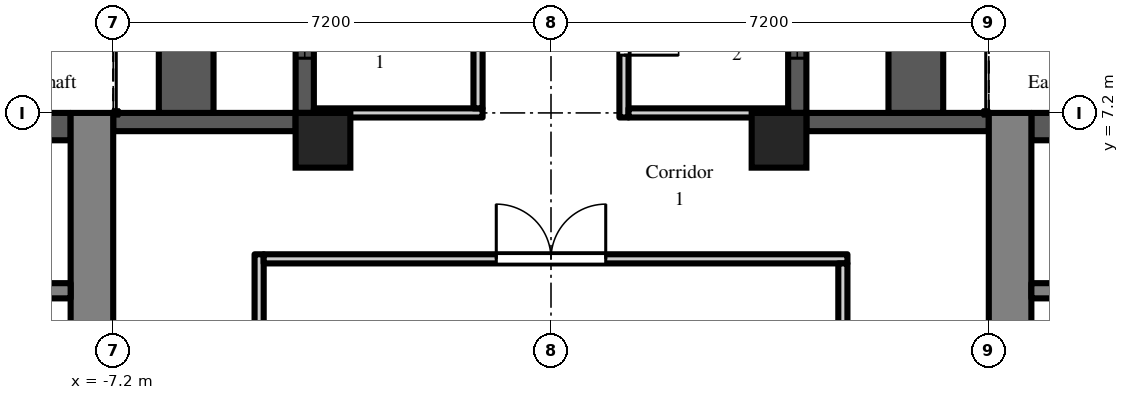
"""IFC4 building model, lengths in metres.
Left out: names, types, materials, properties, quantities, classifications, styles, units other than length and angle.
Written with IfcOpenShell. Run it as: python <this file> out.ifc"""

import sys

from ifc_helpers import new_model, si_unit, direction, frame, frame_2d, origin, origin_2d, place, context, subcontext, project, spatial, rectangle, extrude, element, fill, save


model = new_model("IFC4")
c1 = context("Model", 3, precision=1e-05, world=origin(), true_north=direction((0.0, 1.0)))
c2 = subcontext(c1, "Body", "Model", "MODEL_VIEW")
j1 = project(units=[si_unit("LENGTHUNIT", "METRE"), si_unit("PLANEANGLEUNIT", "RADIAN")], contexts=[c1])
p1 = place(None, origin())
s1 = spatial("IfcSite", under=j1, at=p1, CompositionType="ELEMENT")
p2 = place(p1, origin())
s2 = spatial("IfcBuilding", under=s1, at=p2, CompositionType="ELEMENT")
p3 = place(p2, frame((0.0, 0.0, 123.3)))
s3 = spatial("IfcBuildingStorey", under=s2, at=p3, CompositionType="ELEMENT", Elevation=123.3)
for number, where, z_axis, x_axis in (
    (1, (-3.75, 6.75, 0.0), (0.0, 0.0, 1.0), (1.0, 0.0, 0.0)),
    (2, (3.75, 6.75, 0.0), (0.0, 0.0, 1.0), (1.0, 0.0, 0.0)),
):
    element("IfcColumn", number, at=place(p3, frame(where, z_axis=z_axis, x_axis=x_axis)), inside=s3, PredefinedType="COLUMN", context=c2, shape_type="SweptSolid", body=[
        extrude(rectangle(XDim=0.9, YDim=0.9, at=origin_2d()), origin(), (0.0, 0.0, 1.0), 3.0),
    ])
p4 = place(p3, frame((7.2, 7.05, 0.0), z_axis=(0.0, 0.0, 1.0), x_axis=(-1.0, 0.0, 0.0)))
e3 = element("IfcWall", 3, at=p4, inside=s3, PredefinedType="SOLIDWALL", context=c2, shape_type="SweptSolid", body=[
    extrude(rectangle(XDim=3.0, YDim=0.3, at=frame_2d((1.5, 0.0))), origin(), (0.0, 0.0, 1.0), 2.2),
])
p5 = place(p3, frame((4.05, 7.2, 0.0), z_axis=(0.0, 0.0, 1.0), x_axis=(0.0, 1.0, 0.0)))
e4 = element("IfcWall", 4, at=p5, inside=s3, PredefinedType="SOLIDWALL", context=c2, shape_type="SweptSolid", body=[
    extrude(rectangle(XDim=7.2, YDim=0.3, at=frame_2d((3.6, 0.0))), origin(), (0.0, 0.0, 1.0), 2.2),
])
p6 = place(p5, frame((3.0, 0.0, 0.0)))
e5 = element("IfcOpeningElement", 5, at=p6, cuts=e4, PredefinedType="OPENING", context=c2, shape_type="SweptSolid", body=[
    extrude(rectangle(XDim=1.2, YDim=2.05, at=frame_2d((0.6, 1.025))), frame((0.0, 0.16, 0.0), z_axis=(0.0, -1.0, 0.0), x_axis=(1.0, 0.0, 0.0)), (0.0, 0.0, 1.0), 0.32),
])
p7 = place(p5, frame((0.9, 0.0, 0.2)))
e6 = element("IfcOpeningElement", 6, at=p7, cuts=e4, PredefinedType="OPENING", context=c2, shape_type="SweptSolid", body=[
    extrude(rectangle(XDim=1.8, YDim=1.85, at=frame_2d((0.9, 0.925))), frame((0.0, 0.16, 0.0), z_axis=(0.0, -1.0, 0.0), x_axis=(1.0, 0.0, 0.0)), (0.0, 0.0, 1.0), 0.32),
])
p8 = place(p5, frame((4.5, 0.0, 0.2)))
e7 = element("IfcOpeningElement", 7, at=p8, cuts=e4, PredefinedType="OPENING", context=c2, shape_type="SweptSolid", body=[
    extrude(rectangle(XDim=1.8, YDim=1.85, at=frame_2d((0.9, 0.925))), frame((0.0, 0.16, 0.0), z_axis=(0.0, -1.0, 0.0), x_axis=(1.0, 0.0, 0.0)), (0.0, 0.0, 1.0), 0.32),
])
p9 = place(p3, frame((-4.05, 14.4, 0.0), z_axis=(0.0, 0.0, 1.0), x_axis=(0.0, -1.0, 0.0)))
e8 = element("IfcWall", 8, at=p9, inside=s3, PredefinedType="SOLIDWALL", context=c2, shape_type="SweptSolid", body=[
    extrude(rectangle(XDim=7.2, YDim=0.3, at=frame_2d((3.6, 0.0))), origin(), (0.0, 0.0, 1.0), 2.2),
])
p10 = place(p9, frame((3.0, 0.0, 0.0)))
e9 = element("IfcOpeningElement", 9, at=p10, cuts=e8, PredefinedType="OPENING", context=c2, shape_type="SweptSolid", body=[
    extrude(rectangle(XDim=1.2, YDim=2.05, at=frame_2d((0.6, 1.025))), frame((0.0, 0.16, 0.0), z_axis=(0.0, -1.0, 0.0), x_axis=(1.0, 0.0, 0.0)), (0.0, 0.0, 1.0), 0.32),
])
p11 = place(p9, frame((0.9, 0.0, 0.2)))
e10 = element("IfcOpeningElement", 10, at=p11, cuts=e8, PredefinedType="OPENING", context=c2, shape_type="SweptSolid", body=[
    extrude(rectangle(XDim=1.8, YDim=1.85, at=frame_2d((0.9, 0.925))), frame((0.0, 0.16, 0.0), z_axis=(0.0, -1.0, 0.0), x_axis=(1.0, 0.0, 0.0)), (0.0, 0.0, 1.0), 0.32),
])
p12 = place(p9, frame((4.5, 0.0, 0.2)))
e11 = element("IfcOpeningElement", 11, at=p12, cuts=e8, PredefinedType="OPENING", context=c2, shape_type="SweptSolid", body=[
    extrude(rectangle(XDim=1.8, YDim=1.85, at=frame_2d((0.9, 0.925))), frame((0.0, 0.16, 0.0), z_axis=(0.0, -1.0, 0.0), x_axis=(1.0, 0.0, 0.0)), (0.0, 0.0, 1.0), 0.32),
])
p13 = place(p3, frame((-4.2, 7.05, 0.0), z_axis=(0.0, 0.0, 1.0), x_axis=(-1.0, 0.0, 0.0)))
e12 = element("IfcWall", 12, at=p13, inside=s3, PredefinedType="SOLIDWALL", context=c2, shape_type="SweptSolid", body=[
    extrude(rectangle(XDim=3.0, YDim=0.3, at=frame_2d((1.5, 0.0))), origin(), (0.0, 0.0, 1.0), 2.2),
])
for number, where, z_axis, x_axis in (
    (13, (6.0, 7.2, 0.0), (0.0, 0.0, 1.0), (0.0, 1.0, 0.0)),
    (14, (-6.0, 7.2, 0.0), (0.0, 0.0, 1.0), (0.0, 1.0, 0.0)),
):
    element("IfcWall", number, at=place(p3, frame(where, z_axis=z_axis, x_axis=x_axis)), inside=s3, PredefinedType="PARAPET", context=c2, shape_type="SweptSolid", body=[
        extrude(rectangle(XDim=7.2, YDim=0.9, at=frame_2d((3.6, 0.0))), origin(), (0.0, 0.0, 1.0), 0.8),
    ])
p14 = place(p3, frame((7.55, -7.2, 0.0), z_axis=(0.0, 0.0, 1.0), x_axis=(0.0, 1.0, 0.0)))
e15 = element("IfcWall", 15, at=p14, inside=s3, PredefinedType="SHEAR", context=c2, shape_type="SweptSolid", body=[
    extrude(rectangle(XDim=14.4, YDim=0.7, at=frame_2d((7.2, 0.0))), origin(), (0.0, 0.0, 1.0), 2.6),
])
p15 = place(p14, frame((6.0, 0.0, 0.0)))
e16 = element("IfcOpeningElement", 16, at=p15, cuts=e15, PredefinedType="OPENING", context=c2, shape_type="SweptSolid", body=[
    extrude(rectangle(XDim=2.4, YDim=2.2, at=frame_2d((1.2, 1.1))), frame((0.0, 0.36, 0.0), z_axis=(0.0, -1.0, 0.0), x_axis=(1.0, 0.0, 0.0)), (0.0, 0.0, 1.0), 0.72),
])
p16 = place(p3, frame((7.9, 6.975, 0.0), z_axis=(0.0, 0.0, 1.0), x_axis=(1.0, 0.0, 0.0)))
e17 = element("IfcWall", 17, at=p16, inside=s3, PredefinedType="SHEAR", context=c2, shape_type="SweptSolid", body=[
    extrude(rectangle(XDim=12.95, YDim=0.45, at=frame_2d((6.475, 0.0))), origin(), (0.0, 0.0, 1.0), 2.6),
])
p17 = place(p3, frame((7.9, 4.275, 0.0), z_axis=(0.0, 0.0, 1.0), x_axis=(1.0, 0.0, 0.0)))
e18 = element("IfcWall", 18, at=p17, inside=s3, PredefinedType="SHEAR", context=c2, shape_type="SweptSolid", body=[
    extrude(rectangle(XDim=1.95, YDim=0.25, at=frame_2d((0.975, 0.0))), origin(), (0.0, 0.0, 1.0), 2.6),
])
p18 = place(p3, frame((-7.55, -7.2, 0.0), z_axis=(0.0, 0.0, 1.0), x_axis=(0.0, 1.0, 0.0)))
e19 = element("IfcWall", 19, at=p18, inside=s3, PredefinedType="SHEAR", context=c2, shape_type="SweptSolid", body=[
    extrude(rectangle(XDim=14.4, YDim=0.7, at=frame_2d((7.2, 0.0))), origin(), (0.0, 0.0, 1.0), 2.6),
])
p19 = place(p18, frame((6.0, 0.0, 0.0)))
e20 = element("IfcOpeningElement", 20, at=p19, cuts=e19, PredefinedType="OPENING", context=c2, shape_type="SweptSolid", body=[
    extrude(rectangle(XDim=2.4, YDim=2.2, at=frame_2d((1.2, 1.1))), frame((0.0, 0.36, 0.0), z_axis=(0.0, -1.0, 0.0), x_axis=(1.0, 0.0, 0.0)), (0.0, 0.0, 1.0), 0.72),
])
p20 = place(p3, frame((-7.9, 6.975, 0.0), z_axis=(0.0, 0.0, 1.0), x_axis=(-1.0, 0.0, 0.0)))
e21 = element("IfcWall", 21, at=p20, inside=s3, PredefinedType="SHEAR", context=c2, shape_type="SweptSolid", body=[
    extrude(rectangle(XDim=12.95, YDim=0.45, at=frame_2d((6.475, 0.0))), origin(), (0.0, 0.0, 1.0), 2.6),
])
p21 = place(p3, frame((-7.9, 4.275, 0.0), z_axis=(0.0, 0.0, 1.0), x_axis=(-1.0, 0.0, 0.0)))
e22 = element("IfcWall", 22, at=p21, inside=s3, PredefinedType="SHEAR", context=c2, shape_type="SweptSolid", body=[
    extrude(rectangle(XDim=1.95, YDim=0.25, at=frame_2d((0.975, 0.0))), origin(), (0.0, 0.0, 1.0), 2.6),
])
p22 = place(p3, frame((-4.8, -4.875, 0.0), z_axis=(0.0, 0.0, 1.0), x_axis=(0.0, 1.0, 0.0)))
e23 = element("IfcWall", 23, at=p22, inside=s3, PredefinedType="PARTITIONING", context=c2, shape_type="SweptSolid", body=[
    extrude(rectangle(XDim=9.75, YDim=0.15, at=frame_2d((4.875, 0.0))), origin(), (0.0, 0.0, 1.0), 2.6),
])
p23 = place(p3, frame((-4.725, 4.8, 0.0), z_axis=(0.0, 0.0, 1.0), x_axis=(1.0, 0.0, 0.0)))
e24 = element("IfcWall", 24, at=p23, inside=s3, PredefinedType="PARTITIONING", context=c2, shape_type="SweptSolid", body=[
    extrude(rectangle(XDim=9.6, YDim=0.15, at=frame_2d((4.8, 0.0))), origin(), (0.0, 0.0, 1.0), 2.6),
])
p24 = place(p23, frame((3.825, 0.0, 0.0)))
e25 = element("IfcOpeningElement", 25, at=p24, cuts=e24, PredefinedType="OPENING", context=c2, shape_type="SweptSolid", body=[
    extrude(rectangle(XDim=1.8, YDim=2.1, at=frame_2d((0.9, 1.05))), frame((0.0, 0.085, 0.0), z_axis=(0.0, -1.0, 0.0), x_axis=(1.0, 0.0, 0.0)), (0.0, 0.0, 1.0), 0.17),
])
p25 = place(p3, frame((-3.9, 7.2, 0.0), z_axis=(0.0, 0.0, 1.0), x_axis=(1.0, 0.0, 0.0)))
e26 = element("IfcWall", 26, at=p25, inside=s3, PredefinedType="PARTITIONING", context=c2, shape_type="SweptSolid", body=[
    extrude(rectangle(XDim=2.775, YDim=0.15, at=frame_2d((1.387, 0.0))), origin(), (0.0, 0.0, 1.0), 2.6),
])
p26 = place(p3, frame((-1.2, 7.275, 0.0), z_axis=(0.0, 0.0, 1.0), x_axis=(0.0, 1.0, 0.0)))
e27 = element("IfcWall", 27, at=p26, inside=s3, PredefinedType="PARTITIONING", context=c2, shape_type="SweptSolid", body=[
    extrude(rectangle(XDim=14.025, YDim=0.15, at=frame_2d((7.013, 0.0))), origin(), (0.0, 0.0, 1.0), 2.6),
])
p27 = place(p26, frame((4.875, 0.0, 0.0)))
e28 = element("IfcOpeningElement", 28, at=p27, cuts=e27, PredefinedType="OPENING", context=c2, shape_type="SweptSolid", body=[
    extrude(rectangle(XDim=0.9, YDim=2.1, at=frame_2d((0.45, 1.05))), frame((0.0, 0.085, 0.0), z_axis=(0.0, -1.0, 0.0), x_axis=(1.0, 0.0, 0.0)), (0.0, 0.0, 1.0), 0.17),
])
p28 = place(p26, frame((7.725, 0.0, 0.0)))
e29 = element("IfcOpeningElement", 29, at=p28, cuts=e27, PredefinedType="OPENING", context=c2, shape_type="SweptSolid", body=[
    extrude(rectangle(XDim=1.0, YDim=2.1, at=frame_2d((0.5, 1.05))), frame((0.0, 0.085, 0.0), z_axis=(0.0, -1.0, 0.0), x_axis=(1.0, 0.0, 0.0)), (0.0, 0.0, 1.0), 0.17),
])
p29 = place(p26, frame((11.925, 0.0, 0.0)))
e30 = element("IfcOpeningElement", 30, at=p29, cuts=e27, PredefinedType="OPENING", context=c2, shape_type="SweptSolid", body=[
    extrude(rectangle(XDim=0.9, YDim=2.1, at=frame_2d((0.45, 1.05))), frame((0.0, 0.085, 0.0), z_axis=(0.0, -1.0, 0.0), x_axis=(1.0, 0.0, 0.0)), (0.0, 0.0, 1.0), 0.17),
])
p30 = place(p3, frame((1.2, 7.125, 0.0), z_axis=(0.0, 0.0, 1.0), x_axis=(0.0, 1.0, 0.0)))
e31 = element("IfcWall", 31, at=p30, inside=s3, PredefinedType="PARTITIONING", context=c2, shape_type="SweptSolid", body=[
    extrude(rectangle(XDim=14.175, YDim=0.15, at=frame_2d((7.087, 0.0))), origin(), (0.0, 0.0, 1.0), 2.6),
])
p31 = place(p30, frame((1.025, 0.0, 0.0)))
e32 = element("IfcOpeningElement", 32, at=p31, cuts=e31, PredefinedType="OPENING", context=c2, shape_type="SweptSolid", body=[
    extrude(rectangle(XDim=0.9, YDim=2.1, at=frame_2d((0.45, 1.05))), frame((0.0, 0.085, 0.0), z_axis=(0.0, -1.0, 0.0), x_axis=(1.0, 0.0, 0.0)), (0.0, 0.0, 1.0), 0.17),
])
p32 = place(p30, frame((4.625, 0.0, 0.0)))
e33 = element("IfcOpeningElement", 33, at=p32, cuts=e31, PredefinedType="OPENING", context=c2, shape_type="SweptSolid", body=[
    extrude(rectangle(XDim=0.9, YDim=2.1, at=frame_2d((0.45, 1.05))), frame((0.0, 0.085, 0.0), z_axis=(0.0, -1.0, 0.0), x_axis=(1.0, 0.0, 0.0)), (0.0, 0.0, 1.0), 0.17),
])
p33 = place(p30, frame((7.725, 0.0, 0.0)))
e34 = element("IfcOpeningElement", 34, at=p33, cuts=e31, PredefinedType="OPENING", context=c2, shape_type="SweptSolid", body=[
    extrude(rectangle(XDim=0.9, YDim=2.1, at=frame_2d((0.45, 1.05))), frame((0.0, 0.085, 0.0), z_axis=(0.0, -1.0, 0.0), x_axis=(1.0, 0.0, 0.0)), (0.0, 0.0, 1.0), 0.17),
])
p34 = place(p30, frame((9.525, 0.0, 0.0)))
e35 = element("IfcOpeningElement", 35, at=p34, cuts=e31, PredefinedType="OPENING", context=c2, shape_type="SweptSolid", body=[
    extrude(rectangle(XDim=0.9, YDim=2.1, at=frame_2d((0.45, 1.05))), frame((0.0, 0.085, 0.0), z_axis=(0.0, -1.0, 0.0), x_axis=(1.0, 0.0, 0.0)), (0.0, 0.0, 1.0), 0.17),
])
p35 = place(p30, frame((12.075, 0.0, 0.0)))
e36 = element("IfcOpeningElement", 36, at=p35, cuts=e31, PredefinedType="OPENING", context=c2, shape_type="SweptSolid", body=[
    extrude(rectangle(XDim=0.9, YDim=2.1, at=frame_2d((0.45, 1.05))), frame((0.0, 0.085, 0.0), z_axis=(0.0, -1.0, 0.0), x_axis=(1.0, 0.0, 0.0)), (0.0, 0.0, 1.0), 0.17),
])
p36 = place(p3, frame((1.275, 7.2, 0.0), z_axis=(0.0, 0.0, 1.0), x_axis=(1.0, 0.0, 0.0)))
e37 = element("IfcWall", 37, at=p36, inside=s3, PredefinedType="PARTITIONING", context=c2, shape_type="SweptSolid", body=[
    extrude(rectangle(XDim=2.625, YDim=0.15, at=frame_2d((1.312, 0.0))), origin(), (0.0, 0.0, 1.0), 2.6),
])
p37 = place(p3, frame((4.8, -4.725, 0.0), z_axis=(0.0, 0.0, 1.0), x_axis=(0.0, 1.0, 0.0)))
e38 = element("IfcWall", 38, at=p37, inside=s3, PredefinedType="PARTITIONING", context=c2, shape_type="SweptSolid", body=[
    extrude(rectangle(XDim=9.45, YDim=0.15, at=frame_2d((4.725, 0.0))), origin(), (0.0, 0.0, 1.0), 2.6),
])
p38 = place(p7, origin())
e39 = element("IfcWindow", 39, at=p38, inside=s3, PartitioningType="SINGLE_PANEL", PredefinedType="WINDOW", context=c2, shape_type="SweptSolid", body=[
    extrude(rectangle(XDim=1.8, YDim=1.85, at=frame_2d((0.9, 0.925))), frame((0.0, 0.03, 0.0), z_axis=(0.0, -1.0, 0.0), x_axis=(1.0, 0.0, 0.0)), (0.0, 0.0, 1.0), 0.06),
])
fill(e6, e39)
p39 = place(p12, origin())
e40 = element("IfcWindow", 40, at=p39, inside=s3, PartitioningType="SINGLE_PANEL", PredefinedType="WINDOW", context=c2, shape_type="SweptSolid", body=[
    extrude(rectangle(XDim=1.8, YDim=1.85, at=frame_2d((0.9, 0.925))), frame((0.0, 0.03, 0.0), z_axis=(0.0, -1.0, 0.0), x_axis=(1.0, 0.0, 0.0)), (0.0, 0.0, 1.0), 0.06),
])
fill(e11, e40)
p40 = place(p24, origin())
e41 = element("IfcDoor", 41, at=p40, inside=s3, OperationType="DOUBLE_DOOR_DOUBLE_SWING", PredefinedType="DOOR", context=c2, shape_type="SweptSolid", body=[
    extrude(rectangle(XDim=1.8, YDim=2.1, at=frame_2d((0.9, 1.05))), frame((0.0, 0.025, 0.0), z_axis=(0.0, -1.0, 0.0), x_axis=(1.0, 0.0, 0.0)), (0.0, 0.0, 1.0), 0.05),
])
fill(e25, e41)
p41 = place(p31, frame((0.9, 0.0, 0.0), z_axis=(0.0, 0.0, 1.0), x_axis=(-1.0, 0.0, 0.0)))
e42 = element("IfcDoor", 42, at=p41, inside=s3, OperationType="SINGLE_SWING_RIGHT", PredefinedType="DOOR", context=c2, shape_type="SweptSolid", body=[
    extrude(rectangle(XDim=0.9, YDim=2.1, at=frame_2d((0.45, 1.05))), frame((0.0, 0.025, 0.0), z_axis=(0.0, -1.0, 0.0), x_axis=(1.0, 0.0, 0.0)), (0.0, 0.0, 1.0), 0.05),
])
fill(e32, e42)
save(model, sys.argv[1])
